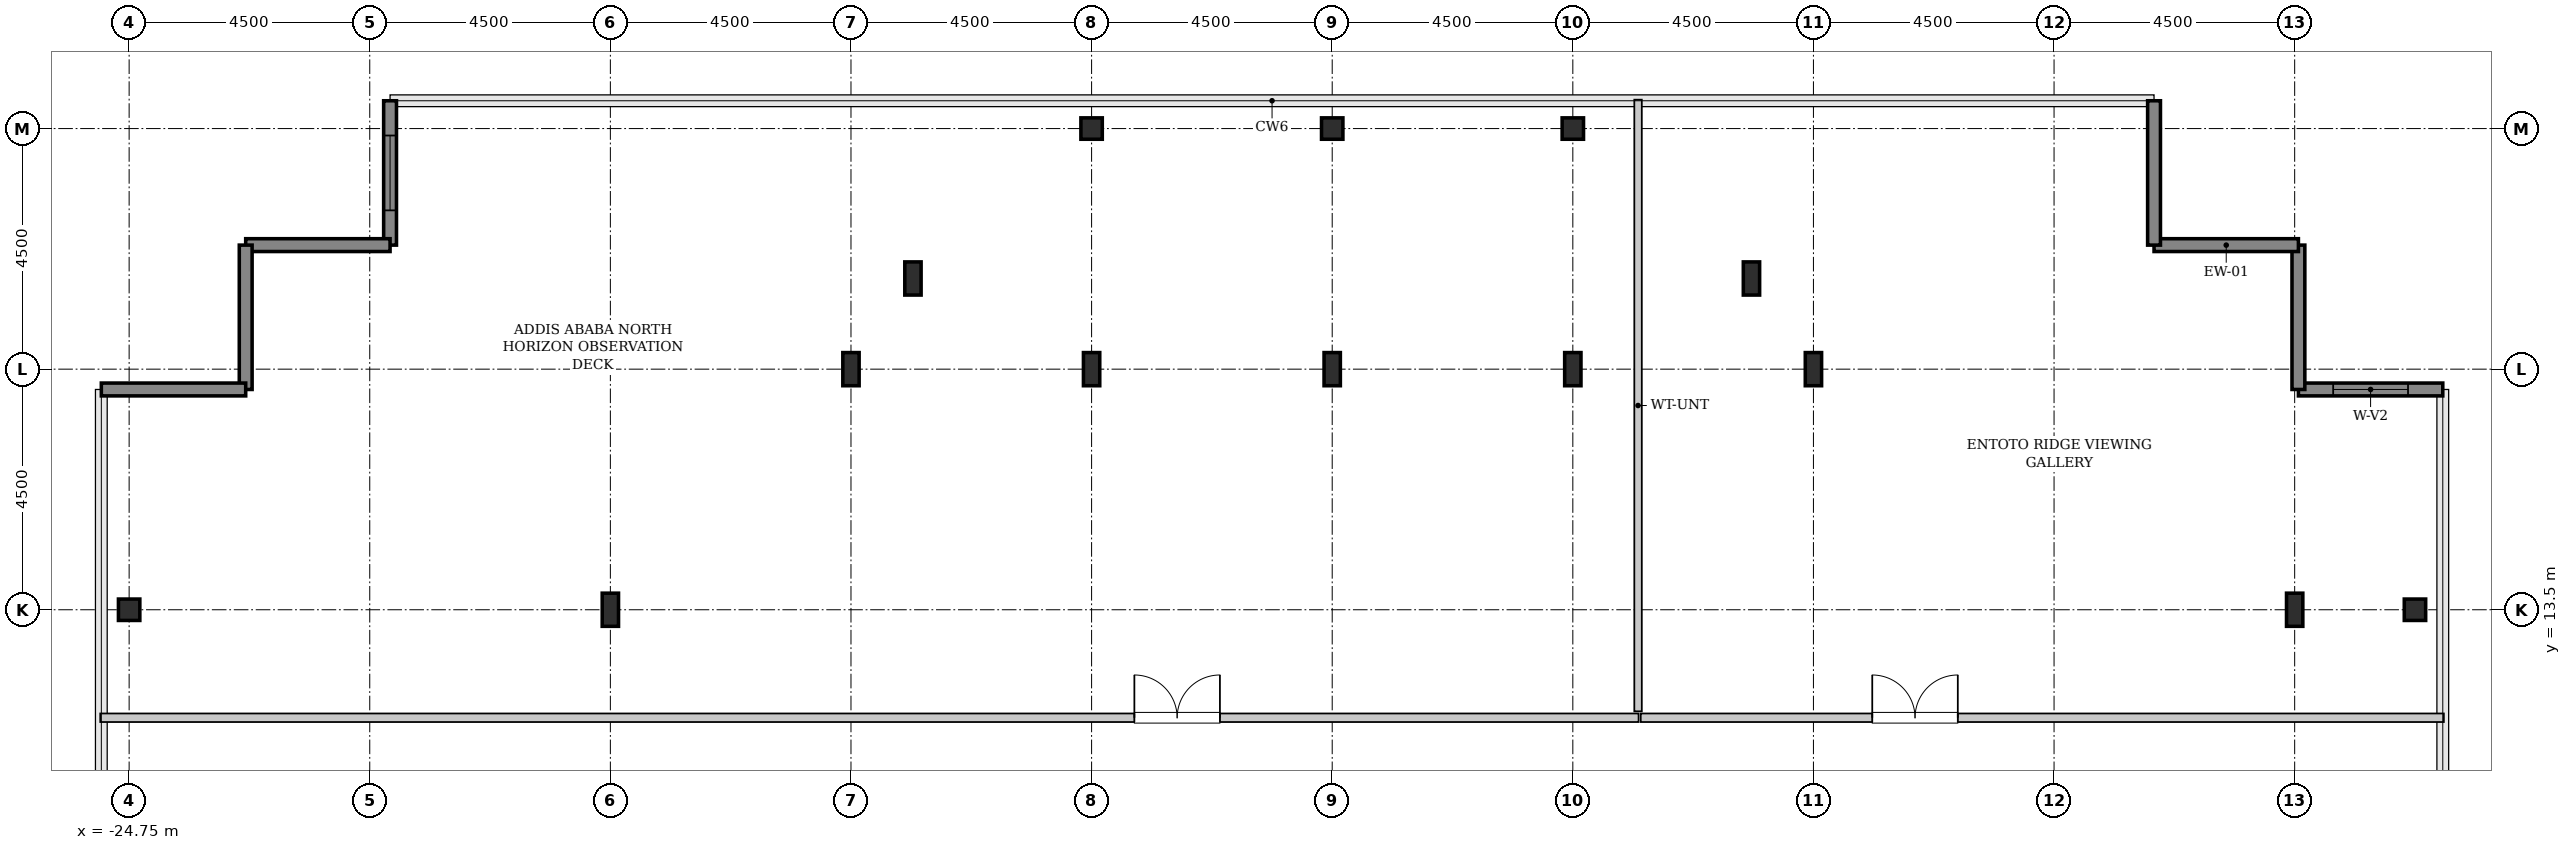
"""IFC4 building model, lengths in metres.
Left out: names, types, materials, properties, quantities, classifications, styles, units other than length and angle.
Written with IfcOpenShell. Run it as: python <this file> out.ifc"""

import sys

from ifc_helpers import new_model, si_unit, direction, frame, frame_2d, origin, origin_2d, place, context, subcontext, project, spatial, rectangle, hollow_rectangle, i_section, extrude, source, transform, mapped, element, fill, save


model = new_model("IFC4")
c1 = context("Model", 3, precision=1e-05, world=origin(), true_north=direction((0.0, 1.0)))
c2 = subcontext(c1, "Body", "Model", "MODEL_VIEW")
j1 = project(units=[si_unit("LENGTHUNIT", "METRE"), si_unit("PLANEANGLEUNIT", "RADIAN")], contexts=[c1])
p1 = place(None, origin())
s1 = spatial("IfcSite", under=j1, at=p1, CompositionType="ELEMENT")
p2 = place(p1, origin())
s2 = spatial("IfcBuilding", under=s1, at=p2, CompositionType="ELEMENT")
p3 = place(p2, frame((0.0, 0.0, 353.8)))
s3 = spatial("IfcBuildingStorey", under=s2, at=p3, CompositionType="ELEMENT", Elevation=353.8)
m1 = source(origin(), c2, "Body", "SweptSolid", [
    extrude(hollow_rectangle(XDim=0.4, YDim=0.4, WallThickness=0.02, InnerFilletRadius=0.02, OuterFilletRadius=0.04, at=origin_2d()), origin(), (0.0, 0.0, 1.0), 4.8),
])
p4 = place(p3, frame((-24.75, 13.5, 0.0), z_axis=(0.0, 0.0, 1.0), x_axis=(1.0, 0.0, 0.0)))
e1 = element("IfcColumn", 1, at=p4, inside=s3, PredefinedType="COLUMN", context=c2, shape_type="MappedRepresentation", body=[
    mapped(m1, transform((0.0, 0.0, 0.0), x_axis=(1.0, 0.0, 0.0), y_axis=(0.0, 1.0, 0.0), z_axis=(0.0, 0.0, 1.0), scale=1.0)),
])
m2 = source(origin(), c2, "Body", "SweptSolid", [
    extrude(i_section(OverallWidth=0.305, OverallDepth=0.62, WebThickness=0.021, FlangeThickness=0.04, FilletRadius=0.027, at=origin_2d()), origin(), (0.0, 0.0, 1.0), 4.8),
])
for number, where, z_axis, x_axis in (
    (2, (-15.75, 13.5, 0.0), (0.0, 0.0, 1.0), (1.0, 0.0, 0.0)),
    (3, (-11.25, 18.0, 0.0), (0.0, 0.0, 1.0), (1.0, 0.0, 0.0)),
    (4, (-10.091, 19.696, 0.0), (0.0, 0.0, 1.0), (1.0, 0.0, 0.0)),
    (5, (-6.75, 18.0, 0.0), (0.0, 0.0, 1.0), (1.0, 0.0, 0.0)),
):
    element("IfcColumn", number, at=place(p3, frame(where, z_axis=z_axis, x_axis=x_axis)), inside=s3, PredefinedType="COLUMN", context=c2, shape_type="MappedRepresentation", body=[
        mapped(m2, transform((0.0, 0.0, 0.0), x_axis=(1.0, 0.0, 0.0), y_axis=(0.0, 1.0, 0.0), z_axis=(0.0, 0.0, 1.0), scale=1.0)),
    ])
p5 = place(p3, frame((-6.75, 22.5, 0.0), z_axis=(0.0, 0.0, 1.0), x_axis=(1.0, 0.0, 0.0)))
e6 = element("IfcColumn", 6, at=p5, inside=s3, PredefinedType="COLUMN", context=c2, shape_type="MappedRepresentation", body=[
    mapped(m1, transform((0.0, 0.0, 0.0), x_axis=(1.0, 0.0, 0.0), y_axis=(0.0, 1.0, 0.0), z_axis=(0.0, 0.0, 1.0), scale=1.0)),
])
p6 = place(p3, frame((-2.25, 18.0, 0.0), z_axis=(0.0, 0.0, 1.0), x_axis=(1.0, 0.0, 0.0)))
e7 = element("IfcColumn", 7, at=p6, inside=s3, PredefinedType="COLUMN", context=c2, shape_type="MappedRepresentation", body=[
    mapped(m2, transform((0.0, 0.0, 0.0), x_axis=(1.0, 0.0, 0.0), y_axis=(0.0, 1.0, 0.0), z_axis=(0.0, 0.0, 1.0), scale=1.0)),
])
p7 = place(p3, frame((-2.25, 22.5, 0.0), z_axis=(0.0, 0.0, 1.0), x_axis=(1.0, 0.0, 0.0)))
e8 = element("IfcColumn", 8, at=p7, inside=s3, PredefinedType="COLUMN", context=c2, shape_type="MappedRepresentation", body=[
    mapped(m1, transform((0.0, 0.0, 0.0), x_axis=(1.0, 0.0, 0.0), y_axis=(0.0, 1.0, 0.0), z_axis=(0.0, 0.0, 1.0), scale=1.0)),
])
p8 = place(p3, frame((2.25, 18.0, 0.0), z_axis=(0.0, 0.0, 1.0), x_axis=(1.0, 0.0, 0.0)))
e9 = element("IfcColumn", 9, at=p8, inside=s3, PredefinedType="COLUMN", context=c2, shape_type="MappedRepresentation", body=[
    mapped(m2, transform((0.0, 0.0, 0.0), x_axis=(1.0, 0.0, 0.0), y_axis=(0.0, 1.0, 0.0), z_axis=(0.0, 0.0, 1.0), scale=1.0)),
])
p9 = place(p3, frame((2.25, 22.5, 0.0), z_axis=(0.0, 0.0, 1.0), x_axis=(1.0, 0.0, 0.0)))
e10 = element("IfcColumn", 10, at=p9, inside=s3, PredefinedType="COLUMN", context=c2, shape_type="MappedRepresentation", body=[
    mapped(m1, transform((0.0, 0.0, 0.0), x_axis=(1.0, 0.0, 0.0), y_axis=(0.0, 1.0, 0.0), z_axis=(0.0, 0.0, 1.0), scale=1.0)),
])
for number, where, z_axis, x_axis in (
    (11, (5.591, 19.696, 0.0), (0.0, 0.0, 1.0), (1.0, 0.0, 0.0)),
    (12, (6.75, 18.0, 0.0), (0.0, 0.0, 1.0), (1.0, 0.0, 0.0)),
    (13, (15.75, 13.5, 0.0), (0.0, 0.0, 1.0), (1.0, 0.0, 0.0)),
):
    element("IfcColumn", number, at=place(p3, frame(where, z_axis=z_axis, x_axis=x_axis)), inside=s3, PredefinedType="COLUMN", context=c2, shape_type="MappedRepresentation", body=[
        mapped(m2, transform((0.0, 0.0, 0.0), x_axis=(1.0, 0.0, 0.0), y_axis=(0.0, 1.0, 0.0), z_axis=(0.0, 0.0, 1.0), scale=1.0)),
    ])
p10 = place(p3, frame((18.0, 13.5, 0.0), z_axis=(0.0, 0.0, 1.0), x_axis=(1.0, 0.0, 0.0)))
e14 = element("IfcColumn", 14, at=p10, inside=s3, PredefinedType="COLUMN", context=c2, shape_type="MappedRepresentation", body=[
    mapped(m1, transform((0.0, 0.0, 0.0), x_axis=(1.0, 0.0, 0.0), y_axis=(0.0, 1.0, 0.0), z_axis=(0.0, 0.0, 1.0), scale=1.0)),
])
m3 = source(origin(), c2, "Body", "SweptSolid", [
    extrude(rectangle(XDim=2.7, YDim=0.24, at=frame_2d((1.35, 0.0))), origin(), (0.0, 0.0, 1.0), 4.5),
])
p11 = place(p3, frame((18.52, 17.62, 0.0), z_axis=(0.0, 0.0, 1.0), x_axis=(-1.0, 0.0, 0.0)))
e15 = element("IfcWall", 15, at=p11, inside=s3, PredefinedType="SHEAR", context=c2, shape_type="MappedRepresentation", body=[
    mapped(m3, transform((0.0, 0.0, 0.0), x_axis=(1.0, 0.0, 0.0), y_axis=(0.0, 1.0, 0.0), z_axis=(0.0, 0.0, 1.0), scale=1.0)),
])
p12 = place(p11, frame((0.65, 0.0, 0.85)))
e16 = element("IfcOpeningElement", 16, at=p12, cuts=e15, PredefinedType="OPENING", context=c2, shape_type="SweptSolid", body=[
    extrude(rectangle(XDim=1.4, YDim=1.8, at=frame_2d((0.7, 0.9))), frame((0.0, 0.13, 0.0), z_axis=(0.0, -1.0, 0.0), x_axis=(1.0, 0.0, 0.0)), (0.0, 0.0, 1.0), 0.26),
])
for number, where, z_axis, x_axis in (
    (17, (15.82, 17.62, 0.0), (0.0, 0.0, 1.0), (0.0, 1.0, 0.0)),
    (18, (15.82, 20.32, 0.0), (0.0, 0.0, 1.0), (-1.0, 0.0, 0.0)),
    (19, (13.12, 20.32, 0.0), (0.0, 0.0, 1.0), (0.0, 1.0, 0.0)),
):
    element("IfcWall", number, at=place(p3, frame(where, z_axis=z_axis, x_axis=x_axis)), inside=s3, PredefinedType="SHEAR", context=c2, shape_type="MappedRepresentation", body=[
        mapped(m3, transform((0.0, 0.0, 0.0), x_axis=(1.0, 0.0, 0.0), y_axis=(0.0, 1.0, 0.0), z_axis=(0.0, 0.0, 1.0), scale=1.0)),
    ])
p13 = place(p3, frame((-19.87, 23.02, 0.0), z_axis=(0.0, 0.0, 1.0), x_axis=(0.0, -1.0, 0.0)))
e20 = element("IfcWall", 20, at=p13, inside=s3, PredefinedType="SHEAR", context=c2, shape_type="MappedRepresentation", body=[
    mapped(m3, transform((0.0, 0.0, 0.0), x_axis=(1.0, 0.0, 0.0), y_axis=(0.0, 1.0, 0.0), z_axis=(0.0, 0.0, 1.0), scale=1.0)),
])
p14 = place(p13, frame((0.65, 0.0, 0.85)))
e21 = element("IfcOpeningElement", 21, at=p14, cuts=e20, PredefinedType="OPENING", context=c2, shape_type="SweptSolid", body=[
    extrude(rectangle(XDim=1.4, YDim=1.8, at=frame_2d((0.7, 0.9))), frame((0.0, 0.13, 0.0), z_axis=(0.0, -1.0, 0.0), x_axis=(1.0, 0.0, 0.0)), (0.0, 0.0, 1.0), 0.26),
])
for number, where, z_axis, x_axis in (
    (22, (-19.87, 20.32, 0.0), (0.0, 0.0, 1.0), (-1.0, 0.0, 0.0)),
    (23, (-22.57, 20.32, 0.0), (0.0, 0.0, 1.0), (0.0, -1.0, 0.0)),
    (24, (-22.57, 17.62, 0.0), (0.0, 0.0, 1.0), (-1.0, 0.0, 0.0)),
):
    element("IfcWall", number, at=place(p3, frame(where, z_axis=z_axis, x_axis=x_axis)), inside=s3, PredefinedType="SHEAR", context=c2, shape_type="MappedRepresentation", body=[
        mapped(m3, transform((0.0, 0.0, 0.0), x_axis=(1.0, 0.0, 0.0), y_axis=(0.0, 1.0, 0.0), z_axis=(0.0, 0.0, 1.0), scale=1.0)),
    ])
m4 = source(origin(), c2, "Body", "SweptSolid", [
    extrude(rectangle(XDim=28.77, YDim=0.16, at=frame_2d((14.385, 0.0))), origin(), (0.0, 0.0, 1.0), 4.485),
])
p15 = place(p3, frame((-25.29, 11.48, 0.0), z_axis=(0.0, 0.0, 1.0), x_axis=(1.0, 0.0, 0.0)))
e25 = element("IfcWall", 25, at=p15, inside=s3, PredefinedType="PARTITIONING", context=c2, shape_type="MappedRepresentation", body=[
    mapped(m4, transform((0.0, 0.0, 0.0), x_axis=(1.0, 0.0, 0.0), y_axis=(0.0, 1.0, 0.0), z_axis=(0.0, 0.0, 1.0), scale=1.0)),
])
p16 = place(p15, frame((19.34, 0.0, 0.0)))
e26 = element("IfcOpeningElement", 26, at=p16, cuts=e25, PredefinedType="OPENING", context=c2, shape_type="SweptSolid", body=[
    extrude(rectangle(XDim=1.6, YDim=2.3, at=frame_2d((0.8, 1.15))), frame((0.0, 0.09, 0.0), z_axis=(0.0, -1.0, 0.0), x_axis=(1.0, 0.0, 0.0)), (0.0, 0.0, 1.0), 0.18),
])
m5 = source(origin(), c2, "Body", "SweptSolid", [
    extrude(rectangle(XDim=11.44, YDim=0.14, at=frame_2d((5.72, 0.0))), origin(), (0.0, 0.0, 1.0), 4.485),
])
p17 = place(p3, frame((3.47, 11.6, 0.0), z_axis=(0.0, 0.0, 1.0), x_axis=(0.0, 1.0, 0.0)))
e27 = element("IfcWall", 27, at=p17, inside=s3, PredefinedType="PARTITIONING", context=c2, shape_type="MappedRepresentation", body=[
    mapped(m5, transform((0.0, 0.0, 0.0), x_axis=(1.0, 0.0, 0.0), y_axis=(0.0, 1.0, 0.0), z_axis=(0.0, 0.0, 1.0), scale=1.0)),
])
m6 = source(origin(), c2, "Body", "SweptSolid", [
    extrude(rectangle(XDim=15.02, YDim=0.16, at=frame_2d((7.51, 0.0))), origin(), (0.0, 0.0, 1.0), 4.485),
])
p18 = place(p3, frame((3.52, 11.48, 0.0), z_axis=(0.0, 0.0, 1.0), x_axis=(1.0, 0.0, 0.0)))
e28 = element("IfcWall", 28, at=p18, inside=s3, PredefinedType="PARTITIONING", context=c2, shape_type="MappedRepresentation", body=[
    mapped(m6, transform((0.0, 0.0, 0.0), x_axis=(1.0, 0.0, 0.0), y_axis=(0.0, 1.0, 0.0), z_axis=(0.0, 0.0, 1.0), scale=1.0)),
])
p19 = place(p18, frame((4.33, 0.0, 0.0)))
e29 = element("IfcOpeningElement", 29, at=p19, cuts=e28, PredefinedType="OPENING", context=c2, shape_type="SweptSolid", body=[
    extrude(rectangle(XDim=1.6, YDim=2.3, at=frame_2d((0.8, 1.15))), frame((0.0, 0.09, 0.0), z_axis=(0.0, -1.0, 0.0), x_axis=(1.0, 0.0, 0.0)), (0.0, 0.0, 1.0), 0.18),
])
m7 = source(origin(), c2, "Body", "SweptSolid", [
    extrude(rectangle(XDim=1.4, YDim=1.8, at=frame_2d((0.7, 0.9))), frame((0.0, 0.03, 0.0), z_axis=(0.0, -1.0, 0.0), x_axis=(1.0, 0.0, 0.0)), (0.0, 0.0, 1.0), 0.06),
])
p20 = place(p12, origin())
e30 = element("IfcWindow", 30, at=p20, inside=s3, PartitioningType="SINGLE_PANEL", PredefinedType="WINDOW", context=c2, shape_type="MappedRepresentation", body=[
    mapped(m7, transform((0.0, 0.0, 0.0), x_axis=(1.0, 0.0, 0.0), y_axis=(0.0, 1.0, 0.0), z_axis=(0.0, 0.0, 1.0), scale=1.0)),
])
fill(e16, e30)
p21 = place(p14, origin())
e31 = element("IfcWindow", 31, at=p21, inside=s3, PartitioningType="SINGLE_PANEL", PredefinedType="WINDOW", context=c2, shape_type="MappedRepresentation", body=[
    mapped(m7, transform((0.0, 0.0, 0.0), x_axis=(1.0, 0.0, 0.0), y_axis=(0.0, 1.0, 0.0), z_axis=(0.0, 0.0, 1.0), scale=1.0)),
])
fill(e21, e31)
m8 = source(origin(), c2, "Body", "SweptSolid", [
    extrude(rectangle(XDim=1.6, YDim=2.3, at=frame_2d((0.8, 1.15))), frame((0.0, 0.025, 0.0), z_axis=(0.0, -1.0, 0.0), x_axis=(1.0, 0.0, 0.0)), (0.0, 0.0, 1.0), 0.05),
])
p22 = place(p16, origin())
e32 = element("IfcDoor", 32, at=p22, inside=s3, OperationType="DOUBLE_DOOR_SINGLE_SWING", PredefinedType="DOOR", context=c2, shape_type="MappedRepresentation", body=[
    mapped(m8, transform((0.0, 0.0, 0.0), x_axis=(1.0, 0.0, 0.0), y_axis=(0.0, 1.0, 0.0), z_axis=(0.0, 0.0, 1.0), scale=1.0)),
])
fill(e26, e32)
p23 = place(p19, origin())
e33 = element("IfcDoor", 33, at=p23, inside=s3, OperationType="DOUBLE_DOOR_SINGLE_SWING", PredefinedType="DOOR", context=c2, shape_type="MappedRepresentation", body=[
    mapped(m8, transform((0.0, 0.0, 0.0), x_axis=(1.0, 0.0, 0.0), y_axis=(0.0, 1.0, 0.0), z_axis=(0.0, 0.0, 1.0), scale=1.0)),
])
fill(e29, e33)
save(model, sys.argv[1])
